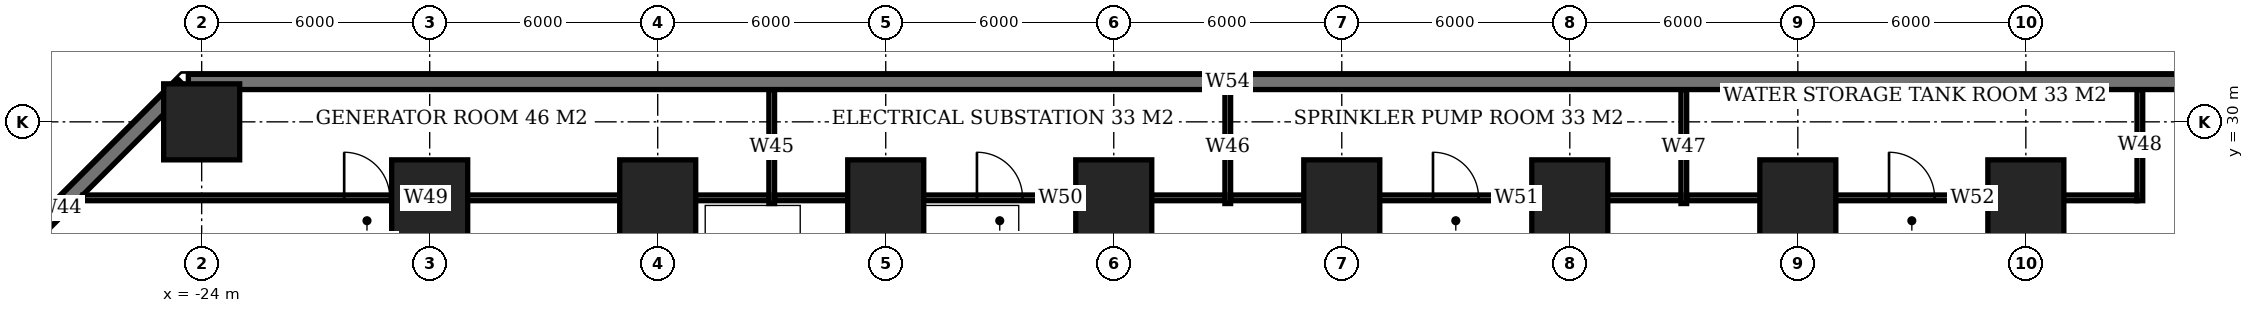
"""IFC4 building model, lengths in metres.
Left out: names, types, materials, properties, quantities, classifications, styles, units other than length and angle.
Written with IfcOpenShell. Run it as: python <this file> out.ifc"""

import sys

from ifc_helpers import new_model, si_unit, direction, frame, frame_2d, origin, origin_2d, place, context, subcontext, project, spatial, rectangle, extrude, element, fill, save


model = new_model("IFC4")
c1 = context("Model", 3, precision=1e-05, world=origin(), true_north=direction((0.0, 1.0)))
c2 = subcontext(c1, "Body", "Model", "MODEL_VIEW")
j1 = project(units=[si_unit("LENGTHUNIT", "METRE"), si_unit("PLANEANGLEUNIT", "RADIAN")], contexts=[c1])
p1 = place(None, origin())
s1 = spatial("IfcSite", under=j1, at=p1, CompositionType="ELEMENT")
p2 = place(p1, origin())
s2 = spatial("IfcBuilding", under=s1, at=p2, CompositionType="ELEMENT")
p3 = place(p2, frame((0.0, 0.0, -9.0)))
s3 = spatial("IfcBuildingStorey", under=s2, at=p3, CompositionType="ELEMENT", Elevation=-9.0)
for number, where, z_axis, x_axis in (
    (1, (-24.0, 30.0, 0.0), (0.0, 0.0, 1.0), (1.0, 0.0, 0.0)),
    (2, (-18.0, 28.0, 0.0), (0.0, 0.0, 1.0), (1.0, 0.0, 0.0)),
    (3, (-12.0, 28.0, 0.0), (0.0, 0.0, 1.0), (1.0, 0.0, 0.0)),
    (4, (-6.0, 28.0, 0.0), (0.0, 0.0, 1.0), (1.0, 0.0, 0.0)),
    (5, (0.0, 28.0, 0.0), (0.0, 0.0, 1.0), (1.0, 0.0, 0.0)),
    (6, (6.0, 28.0, 0.0), (0.0, 0.0, 1.0), (1.0, 0.0, 0.0)),
    (7, (12.0, 28.0, 0.0), (0.0, 0.0, 1.0), (1.0, 0.0, 0.0)),
    (8, (18.0, 28.0, 0.0), (0.0, 0.0, 1.0), (1.0, 0.0, 0.0)),
    (9, (24.0, 28.0, 0.0), (0.0, 0.0, 1.0), (1.0, 0.0, 0.0)),
):
    element("IfcColumn", number, at=place(p3, frame(where, z_axis=z_axis, x_axis=x_axis)), inside=s3, PredefinedType="COLUMN", context=c2, shape_type="SweptSolid", body=[
        extrude(rectangle(XDim=2.0, YDim=2.0, at=origin_2d()), origin(), (0.0, 0.0, 1.0), 4.5),
    ])
p4 = place(p3, frame((-30.99, 24.495, 0.0), z_axis=(0.0, 0.0, 1.0), x_axis=(0.707106781187, 0.707106781187, 0.0)))
e10 = element("IfcWall", 10, at=p4, inside=s3, PredefinedType="USERDEFINED", context=c2, shape_type="SweptSolid", body=[
    extrude(rectangle(XDim=9.186, YDim=0.4, at=frame_2d((4.593, 0.0))), origin(), (0.0, 0.0, 1.0), 4.5),
])
p5 = place(p3, frame((-24.35, 31.05, 0.0), z_axis=(0.0, 0.0, 1.0), x_axis=(1.0, 0.0, 0.0)))
e11 = element("IfcWall", 11, at=p5, inside=s3, PredefinedType="USERDEFINED", context=c2, shape_type="SweptSolid", body=[
    extrude(rectangle(XDim=54.7, YDim=0.4, at=frame_2d((27.35, 0.0))), origin(), (0.0, 0.0, 1.0), 4.5),
])
p6 = place(p3, frame((-27.125, 28.0, 0.0), z_axis=(0.0, 0.0, 1.0), x_axis=(1.0, 0.0, 0.0)))
e12 = element("IfcWall", 12, at=p6, inside=s3, PredefinedType="PARTITIONING", context=c2, shape_type="SweptSolid", body=[
    extrude(rectangle(XDim=18.05, YDim=0.15, at=frame_2d((9.025, 0.0))), origin(), (0.0, 0.0, 1.0), 4.25),
])
p7 = place(p6, frame((6.875, 0.0, 0.0)))
e13 = element("IfcOpeningElement", 13, at=p7, cuts=e12, PredefinedType="OPENING", context=c2, shape_type="SweptSolid", body=[
    extrude(rectangle(XDim=1.2, YDim=2.4, at=frame_2d((0.6, 1.2))), frame((0.0, 0.085, 0.0), z_axis=(0.0, -1.0, 0.0), x_axis=(1.0, 0.0, 0.0)), (0.0, 0.0, 1.0), 0.17),
])
p8 = place(p3, frame((-9.0, 27.85, 0.0), z_axis=(0.0, 0.0, 1.0), x_axis=(0.0, 1.0, 0.0)))
e14 = element("IfcWall", 14, at=p8, inside=s3, PredefinedType="PARTITIONING", context=c2, shape_type="SweptSolid", body=[
    extrude(rectangle(XDim=3.0, YDim=0.15, at=frame_2d((1.5, 0.0))), origin(), (0.0, 0.0, 1.0), 4.25),
])
p9 = place(p3, frame((-8.925, 28.0, 0.0), z_axis=(0.0, 0.0, 1.0), x_axis=(1.0, 0.0, 0.0)))
e15 = element("IfcWall", 15, at=p9, inside=s3, PredefinedType="PARTITIONING", context=c2, shape_type="SweptSolid", body=[
    extrude(rectangle(XDim=11.85, YDim=0.15, at=frame_2d((5.925, 0.0))), origin(), (0.0, 0.0, 1.0), 4.25),
])
p10 = place(p9, frame((5.325, 0.0, 0.0)))
e16 = element("IfcOpeningElement", 16, at=p10, cuts=e15, PredefinedType="OPENING", context=c2, shape_type="SweptSolid", body=[
    extrude(rectangle(XDim=1.2, YDim=2.4, at=frame_2d((0.6, 1.2))), frame((0.0, 0.085, 0.0), z_axis=(0.0, -1.0, 0.0), x_axis=(1.0, 0.0, 0.0)), (0.0, 0.0, 1.0), 0.17),
])
p11 = place(p3, frame((3.0, 27.85, 0.0), z_axis=(0.0, 0.0, 1.0), x_axis=(0.0, 1.0, 0.0)))
e17 = element("IfcWall", 17, at=p11, inside=s3, PredefinedType="PARTITIONING", context=c2, shape_type="SweptSolid", body=[
    extrude(rectangle(XDim=3.0, YDim=0.15, at=frame_2d((1.5, 0.0))), origin(), (0.0, 0.0, 1.0), 4.25),
])
p12 = place(p3, frame((3.075, 28.0, 0.0), z_axis=(0.0, 0.0, 1.0), x_axis=(1.0, 0.0, 0.0)))
e18 = element("IfcWall", 18, at=p12, inside=s3, PredefinedType="PARTITIONING", context=c2, shape_type="SweptSolid", body=[
    extrude(rectangle(XDim=11.85, YDim=0.15, at=frame_2d((5.925, 0.0))), origin(), (0.0, 0.0, 1.0), 4.25),
])
p13 = place(p12, frame((5.325, 0.0, 0.0)))
e19 = element("IfcOpeningElement", 19, at=p13, cuts=e18, PredefinedType="OPENING", context=c2, shape_type="SweptSolid", body=[
    extrude(rectangle(XDim=1.2, YDim=2.4, at=frame_2d((0.6, 1.2))), frame((0.0, 0.085, 0.0), z_axis=(0.0, -1.0, 0.0), x_axis=(1.0, 0.0, 0.0)), (0.0, 0.0, 1.0), 0.17),
])
p14 = place(p3, frame((15.0, 27.85, 0.0), z_axis=(0.0, 0.0, 1.0), x_axis=(0.0, 1.0, 0.0)))
e20 = element("IfcWall", 20, at=p14, inside=s3, PredefinedType="PARTITIONING", context=c2, shape_type="SweptSolid", body=[
    extrude(rectangle(XDim=3.0, YDim=0.15, at=frame_2d((1.5, 0.0))), origin(), (0.0, 0.0, 1.0), 4.25),
])
p15 = place(p3, frame((15.075, 28.0, 0.0), z_axis=(0.0, 0.0, 1.0), x_axis=(1.0, 0.0, 0.0)))
e21 = element("IfcWall", 21, at=p15, inside=s3, PredefinedType="PARTITIONING", context=c2, shape_type="SweptSolid", body=[
    extrude(rectangle(XDim=11.85, YDim=0.15, at=frame_2d((5.925, 0.0))), origin(), (0.0, 0.0, 1.0), 4.25),
])
p16 = place(p15, frame((5.325, 0.0, 0.0)))
e22 = element("IfcOpeningElement", 22, at=p16, cuts=e21, PredefinedType="OPENING", context=c2, shape_type="SweptSolid", body=[
    extrude(rectangle(XDim=1.2, YDim=2.4, at=frame_2d((0.6, 1.2))), frame((0.0, 0.085, 0.0), z_axis=(0.0, -1.0, 0.0), x_axis=(1.0, 0.0, 0.0)), (0.0, 0.0, 1.0), 0.17),
])
p17 = place(p3, frame((27.0, 27.925, 0.0), z_axis=(0.0, 0.0, 1.0), x_axis=(0.0, 1.0, 0.0)))
e23 = element("IfcWall", 23, at=p17, inside=s3, PredefinedType="PARTITIONING", context=c2, shape_type="SweptSolid", body=[
    extrude(rectangle(XDim=2.925, YDim=0.15, at=frame_2d((1.462, 0.0))), origin(), (0.0, 0.0, 1.0), 4.25),
])
p18 = place(p7, origin())
e24 = element("IfcDoor", 24, at=p18, inside=s3, OperationType="SINGLE_SWING_LEFT", PredefinedType="DOOR", context=c2, shape_type="SweptSolid", body=[
    extrude(rectangle(XDim=1.2, YDim=2.4, at=frame_2d((0.6, 1.2))), frame((0.0, 0.025, 0.0), z_axis=(0.0, -1.0, 0.0), x_axis=(1.0, 0.0, 0.0)), (0.0, 0.0, 1.0), 0.05),
])
fill(e13, e24)
p19 = place(p10, origin())
e25 = element("IfcDoor", 25, at=p19, inside=s3, OperationType="SINGLE_SWING_LEFT", PredefinedType="DOOR", context=c2, shape_type="SweptSolid", body=[
    extrude(rectangle(XDim=1.2, YDim=2.4, at=frame_2d((0.6, 1.2))), frame((0.0, 0.025, 0.0), z_axis=(0.0, -1.0, 0.0), x_axis=(1.0, 0.0, 0.0)), (0.0, 0.0, 1.0), 0.05),
])
fill(e16, e25)
p20 = place(p13, origin())
e26 = element("IfcDoor", 26, at=p20, inside=s3, OperationType="SINGLE_SWING_LEFT", PredefinedType="DOOR", context=c2, shape_type="SweptSolid", body=[
    extrude(rectangle(XDim=1.2, YDim=2.4, at=frame_2d((0.6, 1.2))), frame((0.0, 0.025, 0.0), z_axis=(0.0, -1.0, 0.0), x_axis=(1.0, 0.0, 0.0)), (0.0, 0.0, 1.0), 0.05),
])
fill(e19, e26)
p21 = place(p16, origin())
e27 = element("IfcDoor", 27, at=p21, inside=s3, OperationType="SINGLE_SWING_LEFT", PredefinedType="DOOR", context=c2, shape_type="SweptSolid", body=[
    extrude(rectangle(XDim=1.2, YDim=2.4, at=frame_2d((0.6, 1.2))), frame((0.0, 0.025, 0.0), z_axis=(0.0, -1.0, 0.0), x_axis=(1.0, 0.0, 0.0)), (0.0, 0.0, 1.0), 0.05),
])
fill(e22, e27)
save(model, sys.argv[1])
